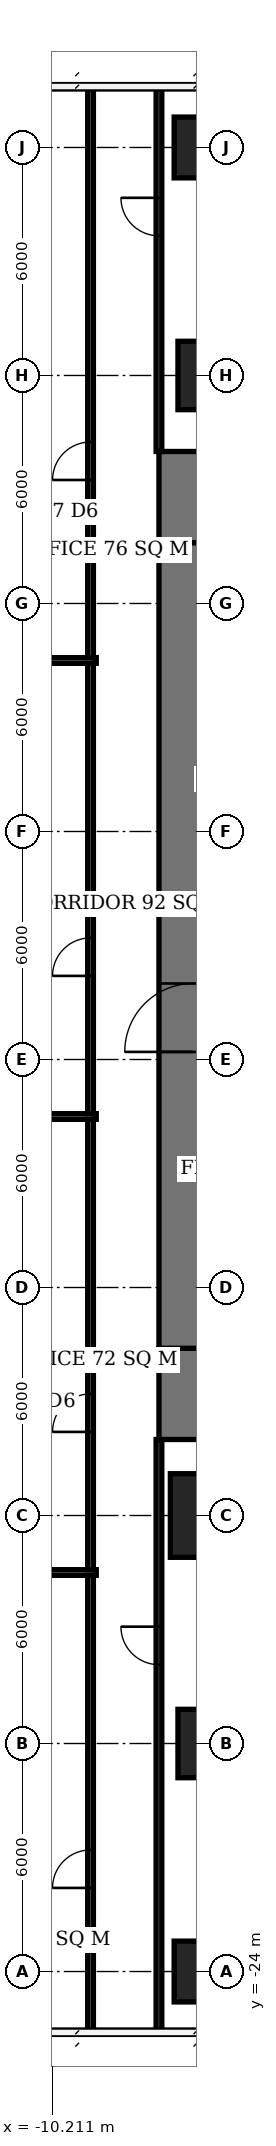
"""IFC4 building model, lengths in metres.
Left out: names, types, materials, properties, quantities, classifications, styles, units other than length and angle.
Written with IfcOpenShell. Run it as: python <this file> out.ifc"""

import sys

from ifc_helpers import new_model, si_unit, direction, frame, frame_2d, origin, origin_2d, place, context, subcontext, project, spatial, rectangle, extrude, element, fill, save


model = new_model("IFC4")
c1 = context("Model", 3, precision=1e-05, world=origin(), true_north=direction((0.0, 1.0)))
c2 = subcontext(c1, "Body", "Model", "MODEL_VIEW")
j1 = project(units=[si_unit("LENGTHUNIT", "METRE"), si_unit("PLANEANGLEUNIT", "RADIAN")], contexts=[c1])
p1 = place(None, origin())
s1 = spatial("IfcSite", under=j1, at=p1, CompositionType="ELEMENT")
p2 = place(p1, origin())
s2 = spatial("IfcBuilding", under=s1, at=p2, CompositionType="ELEMENT")
p3 = place(p2, frame((0.0, 0.0, 53.3)))
s3 = spatial("IfcBuildingStorey", under=s2, at=p3, CompositionType="ELEMENT", Elevation=53.3)
p4 = place(p3, frame((-6.0, -24.0, 0.0), z_axis=(0.0, 0.0, 1.0), x_axis=(1.0, 0.0, 0.0)))
e1 = element("IfcColumn", 1, at=p4, inside=s3, PredefinedType="COLUMN", context=c2, shape_type="SweptSolid", body=[
    extrude(rectangle(XDim=2.0, YDim=1.6, at=origin_2d()), origin(), (0.0, 0.0, 1.0), 3.9),
])
p5 = place(p3, frame((-6.0, -18.0, 0.0), z_axis=(0.0, 0.0, 1.0), x_axis=(1.0, 0.0, 0.0)))
e2 = element("IfcColumn", 2, at=p5, inside=s3, PredefinedType="COLUMN", context=c2, shape_type="SweptSolid", body=[
    extrude(rectangle(XDim=1.8, YDim=1.8, at=origin_2d()), origin(), (0.0, 0.0, 1.0), 3.9),
])
p6 = place(p3, frame((-6.0, -12.0, 0.0), z_axis=(0.0, 0.0, 1.0), x_axis=(1.0, 0.0, 0.0)))
e3 = element("IfcColumn", 3, at=p6, inside=s3, PredefinedType="COLUMN", context=c2, shape_type="SweptSolid", body=[
    extrude(rectangle(XDim=2.2, YDim=2.2, at=origin_2d()), origin(), (0.0, 0.0, 1.0), 3.9),
])
p7 = place(p3, frame((-6.0, 18.0, 0.0), z_axis=(0.0, 0.0, 1.0), x_axis=(1.0, 0.0, 0.0)))
e4 = element("IfcColumn", 4, at=p7, inside=s3, PredefinedType="COLUMN", context=c2, shape_type="SweptSolid", body=[
    extrude(rectangle(XDim=1.8, YDim=1.8, at=origin_2d()), origin(), (0.0, 0.0, 1.0), 3.9),
])
p8 = place(p3, frame((-6.0, 24.0, 0.0), z_axis=(0.0, 0.0, 1.0), x_axis=(1.0, 0.0, 0.0)))
e5 = element("IfcColumn", 5, at=p8, inside=s3, PredefinedType="COLUMN", context=c2, shape_type="SweptSolid", body=[
    extrude(rectangle(XDim=2.0, YDim=1.6, at=origin_2d()), origin(), (0.0, 0.0, 1.0), 3.9),
])
p9 = place(p3, frame((-6.5, -7.6, 0.0), z_axis=(0.0, 0.0, 1.0), x_axis=(0.0, 1.0, 0.0)))
e6 = element("IfcWall", 6, at=p9, inside=s3, PredefinedType="SHEAR", context=c2, shape_type="SweptSolid", body=[
    extrude(rectangle(XDim=21.2, YDim=1.8, at=frame_2d((10.6, 0.0))), origin(), (0.0, 0.0, 1.0), 3.9),
])
p10 = place(p9, frame((7.8, 0.0, 0.0)))
e7 = element("IfcOpeningElement", 7, at=p10, cuts=e6, PredefinedType="OPENING", context=c2, shape_type="SweptSolid", body=[
    extrude(rectangle(XDim=1.8, YDim=2.4, at=frame_2d((0.9, 1.2))), frame((0.0, 0.91, 0.0), z_axis=(0.0, -1.0, 0.0), x_axis=(1.0, 0.0, 0.0)), (0.0, 0.0, 1.0), 1.82),
])
for number, where, z_axis, x_axis in (
    (8, (-6.5, -10.0, 0.0), (0.0, 0.0, 1.0), (0.0, 1.0, 0.0)),
    (9, (-6.5, 13.6, 0.0), (0.0, 0.0, 1.0), (0.0, 1.0, 0.0)),
):
    element("IfcWall", number, at=place(p3, frame(where, z_axis=z_axis, x_axis=x_axis)), inside=s3, PredefinedType="SHEAR", context=c2, shape_type="SweptSolid", body=[
        extrude(rectangle(XDim=2.4, YDim=1.8, at=frame_2d((1.2, 0.0))), origin(), (0.0, 0.0, 1.0), 3.9),
    ])
p11 = place(p3, frame((-19.6, -1.5, 0.0), z_axis=(0.0, 0.0, 1.0), x_axis=(1.0, 0.0, 0.0)))
e10 = element("IfcWall", 10, at=p11, inside=s3, PredefinedType="PARTITIONING", context=c2, shape_type="SweptSolid", body=[
    extrude(rectangle(XDim=10.55, YDim=0.15, at=frame_2d((5.275, 0.0))), origin(), (0.0, 0.0, 1.0), 3.65),
])
p12 = place(p3, frame((-14.025, 10.5, 0.0), z_axis=(0.0, 0.0, 1.0), x_axis=(1.0, 0.0, 0.0)))
e11 = element("IfcWall", 11, at=p12, inside=s3, PredefinedType="PARTITIONING", context=c2, shape_type="SweptSolid", body=[
    extrude(rectangle(XDim=4.975, YDim=0.15, at=frame_2d((2.487, 0.0))), origin(), (0.0, 0.0, 1.0), 3.65),
])
p13 = place(p3, frame((-13.725, -13.5, 0.0), z_axis=(0.0, 0.0, 1.0), x_axis=(1.0, 0.0, 0.0)))
e12 = element("IfcWall", 12, at=p13, inside=s3, PredefinedType="PARTITIONING", context=c2, shape_type="SweptSolid", body=[
    extrude(rectangle(XDim=4.675, YDim=0.15, at=frame_2d((2.337, 0.0))), origin(), (0.0, 0.0, 1.0), 3.65),
])
p14 = place(p3, frame((-9.2, -25.6, 0.0), z_axis=(0.0, 0.0, 1.0), x_axis=(0.0, 1.0, 0.0)))
e13 = element("IfcWall", 13, at=p14, inside=s3, PredefinedType="PARTITIONING", context=c2, shape_type="SweptSolid", body=[
    extrude(rectangle(XDim=12.025, YDim=0.15, at=frame_2d((6.013, 0.0))), origin(), (0.0, 0.0, 1.0), 3.65),
])
p15 = place(p14, frame((3.8, 0.0, 0.0)))
e14 = element("IfcOpeningElement", 14, at=p15, cuts=e13, PredefinedType="OPENING", context=c2, shape_type="SweptSolid", body=[
    extrude(rectangle(XDim=1.0, YDim=2.1, at=frame_2d((0.5, 1.05))), frame((0.0, 0.085, 0.0), z_axis=(0.0, -1.0, 0.0), x_axis=(1.0, 0.0, 0.0)), (0.0, 0.0, 1.0), 0.17),
])
p16 = place(p3, frame((-9.2, -13.425, 0.0), z_axis=(0.0, 0.0, 1.0), x_axis=(0.0, 1.0, 0.0)))
e15 = element("IfcWall", 15, at=p16, inside=s3, PredefinedType="PARTITIONING", context=c2, shape_type="SweptSolid", body=[
    extrude(rectangle(XDim=11.85, YDim=0.15, at=frame_2d((5.925, 0.0))), origin(), (0.0, 0.0, 1.0), 3.65),
])
p17 = place(p16, frame((3.625, 0.0, 0.0)))
e16 = element("IfcOpeningElement", 16, at=p17, cuts=e15, PredefinedType="OPENING", context=c2, shape_type="SweptSolid", body=[
    extrude(rectangle(XDim=1.0, YDim=2.1, at=frame_2d((0.5, 1.05))), frame((0.0, 0.085, 0.0), z_axis=(0.0, -1.0, 0.0), x_axis=(1.0, 0.0, 0.0)), (0.0, 0.0, 1.0), 0.17),
])
p18 = place(p3, frame((-9.2, -1.425, 0.0), z_axis=(0.0, 0.0, 1.0), x_axis=(0.0, 1.0, 0.0)))
e17 = element("IfcWall", 17, at=p18, inside=s3, PredefinedType="PARTITIONING", context=c2, shape_type="SweptSolid", body=[
    extrude(rectangle(XDim=11.85, YDim=0.15, at=frame_2d((5.925, 0.0))), origin(), (0.0, 0.0, 1.0), 3.65),
])
p19 = place(p18, frame((3.625, 0.0, 0.0)))
e18 = element("IfcOpeningElement", 18, at=p19, cuts=e17, PredefinedType="OPENING", context=c2, shape_type="SweptSolid", body=[
    extrude(rectangle(XDim=1.0, YDim=2.1, at=frame_2d((0.5, 1.05))), frame((0.0, 0.085, 0.0), z_axis=(0.0, -1.0, 0.0), x_axis=(1.0, 0.0, 0.0)), (0.0, 0.0, 1.0), 0.17),
])
p20 = place(p3, frame((-9.2, 10.575, 0.0), z_axis=(0.0, 0.0, 1.0), x_axis=(0.0, 1.0, 0.0)))
e19 = element("IfcWall", 19, at=p20, inside=s3, PredefinedType="PARTITIONING", context=c2, shape_type="SweptSolid", body=[
    extrude(rectangle(XDim=15.025, YDim=0.15, at=frame_2d((7.513, 0.0))), origin(), (0.0, 0.0, 1.0), 3.65),
])
p21 = place(p20, frame((4.675, 0.0, 0.0)))
e20 = element("IfcOpeningElement", 20, at=p21, cuts=e19, PredefinedType="OPENING", context=c2, shape_type="SweptSolid", body=[
    extrude(rectangle(XDim=1.0, YDim=2.1, at=frame_2d((0.5, 1.05))), frame((0.0, 0.085, 0.0), z_axis=(0.0, -1.0, 0.0), x_axis=(1.0, 0.0, 0.0)), (0.0, 0.0, 1.0), 0.17),
])
p22 = place(p3, frame((-7.4, -25.6, 0.0), z_axis=(0.0, 0.0, 1.0), x_axis=(0.0, 1.0, 0.0)))
e21 = element("IfcWall", 21, at=p22, inside=s3, PredefinedType="PARTITIONING", context=c2, shape_type="SweptSolid", body=[
    extrude(rectangle(XDim=15.6, YDim=0.15, at=frame_2d((7.8, 0.0))), origin(), (0.0, 0.0, 1.0), 3.65),
])
p23 = place(p22, frame((9.675, 0.0, 0.0)))
e22 = element("IfcOpeningElement", 22, at=p23, cuts=e21, PredefinedType="OPENING", context=c2, shape_type="SweptSolid", body=[
    extrude(rectangle(XDim=1.0, YDim=2.1, at=frame_2d((0.5, 1.05))), frame((0.0, 0.085, 0.0), z_axis=(0.0, -1.0, 0.0), x_axis=(1.0, 0.0, 0.0)), (0.0, 0.0, 1.0), 0.17),
])
p24 = place(p3, frame((-7.4, 16.0, 0.0), z_axis=(0.0, 0.0, 1.0), x_axis=(0.0, 1.0, 0.0)))
e23 = element("IfcWall", 23, at=p24, inside=s3, PredefinedType="PARTITIONING", context=c2, shape_type="SweptSolid", body=[
    extrude(rectangle(XDim=9.6, YDim=0.15, at=frame_2d((4.8, 0.0))), origin(), (0.0, 0.0, 1.0), 3.65),
])
p25 = place(p24, frame((5.675, 0.0, 0.0)))
e24 = element("IfcOpeningElement", 24, at=p25, cuts=e23, PredefinedType="OPENING", context=c2, shape_type="SweptSolid", body=[
    extrude(rectangle(XDim=1.0, YDim=2.1, at=frame_2d((0.5, 1.05))), frame((0.0, 0.085, 0.0), z_axis=(0.0, -1.0, 0.0), x_axis=(1.0, 0.0, 0.0)), (0.0, 0.0, 1.0), 0.17),
])
p26 = place(p10, origin())
e25 = element("IfcDoor", 25, at=p26, inside=s3, OperationType="DOUBLE_DOOR_SINGLE_SWING", PredefinedType="DOOR", context=c2, shape_type="SweptSolid", body=[
    extrude(rectangle(XDim=1.8, YDim=2.4, at=frame_2d((0.9, 1.2))), frame((0.0, 0.025, 0.0), z_axis=(0.0, -1.0, 0.0), x_axis=(1.0, 0.0, 0.0)), (0.0, 0.0, 1.0), 0.05),
])
fill(e7, e25)
p27 = place(p15, origin())
e26 = element("IfcDoor", 26, at=p27, inside=s3, OperationType="SINGLE_SWING_LEFT", PredefinedType="DOOR", context=c2, shape_type="SweptSolid", body=[
    extrude(rectangle(XDim=1.0, YDim=2.1, at=frame_2d((0.5, 1.05))), frame((0.0, 0.025, 0.0), z_axis=(0.0, -1.0, 0.0), x_axis=(1.0, 0.0, 0.0)), (0.0, 0.0, 1.0), 0.05),
])
fill(e14, e26)
p28 = place(p23, origin())
e27 = element("IfcDoor", 27, at=p28, inside=s3, OperationType="SINGLE_SWING_RIGHT", PredefinedType="DOOR", context=c2, shape_type="SweptSolid", body=[
    extrude(rectangle(XDim=1.0, YDim=2.1, at=frame_2d((0.5, 1.05))), frame((0.0, 0.025, 0.0), z_axis=(0.0, -1.0, 0.0), x_axis=(1.0, 0.0, 0.0)), (0.0, 0.0, 1.0), 0.05),
])
fill(e22, e27)
p29 = place(p17, origin())
e28 = element("IfcDoor", 28, at=p29, inside=s3, OperationType="SINGLE_SWING_LEFT", PredefinedType="DOOR", context=c2, shape_type="SweptSolid", body=[
    extrude(rectangle(XDim=1.0, YDim=2.1, at=frame_2d((0.5, 1.05))), frame((0.0, 0.025, 0.0), z_axis=(0.0, -1.0, 0.0), x_axis=(1.0, 0.0, 0.0)), (0.0, 0.0, 1.0), 0.05),
])
fill(e16, e28)
p30 = place(p19, origin())
e29 = element("IfcDoor", 29, at=p30, inside=s3, OperationType="SINGLE_SWING_LEFT", PredefinedType="DOOR", context=c2, shape_type="SweptSolid", body=[
    extrude(rectangle(XDim=1.0, YDim=2.1, at=frame_2d((0.5, 1.05))), frame((0.0, 0.025, 0.0), z_axis=(0.0, -1.0, 0.0), x_axis=(1.0, 0.0, 0.0)), (0.0, 0.0, 1.0), 0.05),
])
fill(e18, e29)
p31 = place(p25, origin())
e30 = element("IfcDoor", 30, at=p31, inside=s3, OperationType="SINGLE_SWING_RIGHT", PredefinedType="DOOR", context=c2, shape_type="SweptSolid", body=[
    extrude(rectangle(XDim=1.0, YDim=2.1, at=frame_2d((0.5, 1.05))), frame((0.0, 0.025, 0.0), z_axis=(0.0, -1.0, 0.0), x_axis=(1.0, 0.0, 0.0)), (0.0, 0.0, 1.0), 0.05),
])
fill(e24, e30)
p32 = place(p21, origin())
e31 = element("IfcDoor", 31, at=p32, inside=s3, OperationType="SINGLE_SWING_LEFT", PredefinedType="DOOR", context=c2, shape_type="SweptSolid", body=[
    extrude(rectangle(XDim=1.0, YDim=2.1, at=frame_2d((0.5, 1.05))), frame((0.0, 0.025, 0.0), z_axis=(0.0, -1.0, 0.0), x_axis=(1.0, 0.0, 0.0)), (0.0, 0.0, 1.0), 0.05),
])
fill(e20, e31)
save(model, sys.argv[1])
